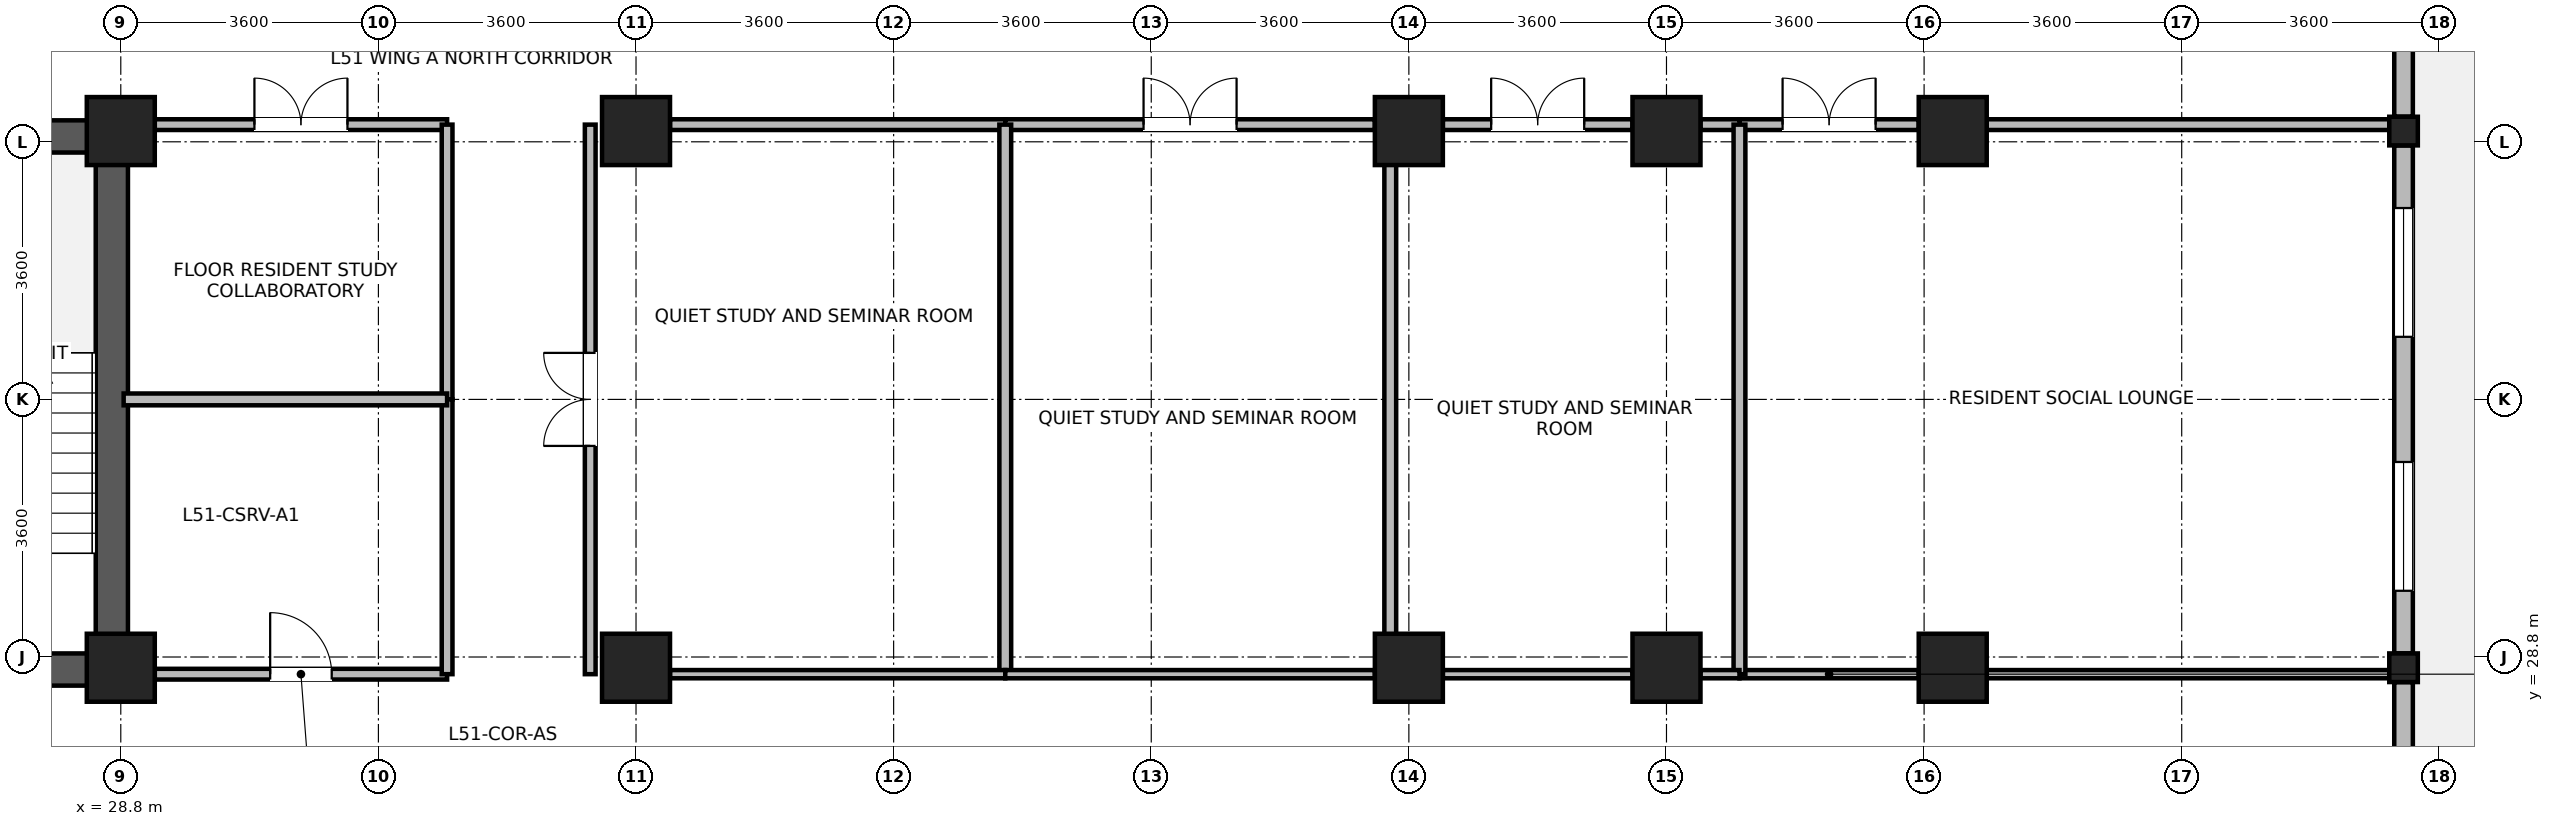
"""IFC4 building model, lengths in metres.
Left out: names, types, materials, properties, quantities, classifications, styles, units other than length and angle.
Written with IfcOpenShell. Run it as: python <this file> out.ifc"""

import sys

from ifc_helpers import new_model, si_unit, direction, frame, frame_2d, origin, origin_2d, place, context, subcontext, project, spatial, rectangle, i_section, extrude, source, transform, mapped, element, fill, save


model = new_model("IFC4")
c1 = context("Model", 3, precision=1e-05, world=origin(), true_north=direction((0.0, 1.0)))
c2 = subcontext(c1, "Body", "Model", "MODEL_VIEW")
j1 = project(units=[si_unit("LENGTHUNIT", "METRE"), si_unit("PLANEANGLEUNIT", "RADIAN")], contexts=[c1])
p1 = place(None, origin())
s1 = spatial("IfcSite", under=j1, at=p1, CompositionType="ELEMENT")
p2 = place(p1, origin())
s2 = spatial("IfcBuilding", under=s1, at=p2, CompositionType="ELEMENT")
p3 = place(p2, frame((0.0, 0.0, 201.8)))
s3 = spatial("IfcBuildingStorey", under=s2, at=p3, CompositionType="ELEMENT", Elevation=201.8)
p4 = place(p3, frame((28.675, 28.4, 0.0), z_axis=(0.0, 0.0, 1.0), x_axis=(0.0, 1.0, 0.0)))
e1 = element("IfcWall", 1, at=p4, inside=s3, PredefinedType="SHEAR", context=c2, shape_type="SweptSolid", body=[
    extrude(rectangle(XDim=7.9, YDim=0.45, at=frame_2d((3.95, 0.0))), origin(), (0.0, 0.0, 1.0), 3.47),
])
for number, where, z_axis, x_axis in (
    (2, (25.25, 28.625, 0.0), (0.0, 0.0, 1.0), (1.0, 0.0, 0.0)),
    (3, (25.25, 36.075, 0.0), (0.0, 0.0, 1.0), (1.0, 0.0, 0.0)),
):
    element("IfcWall", number, at=place(p3, frame(where, z_axis=z_axis, x_axis=x_axis)), inside=s3, PredefinedType="SHEAR", context=c2, shape_type="SweptSolid", body=[
        extrude(rectangle(XDim=3.2, YDim=0.45, at=frame_2d((1.6, 0.0))), origin(), (0.0, 0.0, 1.0), 3.47),
    ])
m1 = source(origin(), c2, "Body", "SweptSolid", [
    extrude(rectangle(XDim=0.95, YDim=0.95, at=origin_2d()), origin(), (0.0, 0.0, 1.0), 3.7),
])
for number, where, z_axis, x_axis in (
    (4, (28.8, 28.65, 0.0), (0.0, 0.0, 1.0), (1.0, 0.0, 0.0)),
    (5, (28.8, 36.15, 0.0), (0.0, 0.0, 1.0), (1.0, 0.0, 0.0)),
    (6, (36.0, 28.65, 0.0), (0.0, 0.0, 1.0), (1.0, 0.0, 0.0)),
    (7, (36.0, 36.15, 0.0), (0.0, 0.0, 1.0), (1.0, 0.0, 0.0)),
    (8, (46.8, 28.65, 0.0), (0.0, 0.0, 1.0), (1.0, 0.0, 0.0)),
    (9, (46.8, 36.15, 0.0), (0.0, 0.0, 1.0), (1.0, 0.0, 0.0)),
    (10, (50.4, 28.65, 0.0), (0.0, 0.0, 1.0), (1.0, 0.0, 0.0)),
    (11, (50.4, 36.15, 0.0), (0.0, 0.0, 1.0), (1.0, 0.0, 0.0)),
    (12, (54.4, 28.65, 0.0), (0.0, 0.0, 1.0), (1.0, 0.0, 0.0)),
    (13, (54.4, 36.15, 0.0), (0.0, 0.0, 1.0), (1.0, 0.0, 0.0)),
):
    element("IfcColumn", number, at=place(p3, frame(where, z_axis=z_axis, x_axis=x_axis)), inside=s3, PredefinedType="COLUMN", context=c2, shape_type="MappedRepresentation", body=[
        mapped(m1, transform((0.0, 0.0, 0.0), x_axis=(1.0, 0.0, 0.0), y_axis=(0.0, 1.0, 0.0), z_axis=(0.0, 0.0, 1.0), scale=1.0)),
    ])
m2 = source(origin(), c2, "Body", "SweptSolid", [
    extrude(i_section(OverallWidth=0.399, OverallDepth=0.4, WebThickness=0.017, FlangeThickness=0.023, FilletRadius=0.015, at=origin_2d()), origin(), (0.0, 0.0, 1.0), 3.7),
])
for number, where, z_axis, x_axis in (
    (14, (60.7, 28.65, 0.0), (0.0, 0.0, 1.0), (1.0, 0.0, 0.0)),
    (15, (60.7, 36.15, 0.0), (0.0, 0.0, 1.0), (1.0, 0.0, 0.0)),
):
    element("IfcColumn", number, at=place(p3, frame(where, z_axis=z_axis, x_axis=x_axis)), inside=s3, PredefinedType="COLUMN", context=c2, shape_type="MappedRepresentation", body=[
        mapped(m2, transform((0.0, 0.0, 0.0), x_axis=(1.0, 0.0, 0.0), y_axis=(0.0, 1.0, 0.0), z_axis=(0.0, 0.0, 1.0), scale=1.0)),
    ])
p5 = place(p3, frame((60.7, 28.449, 0.0), z_axis=(0.0, 0.0, 1.0), x_axis=(0.0, -1.0, 0.0)))
e16 = element("IfcWall", 16, at=p5, inside=s3, PredefinedType="STANDARD", context=c2, shape_type="SweptSolid", body=[
    extrude(rectangle(XDim=6.648, YDim=0.26, at=frame_2d((3.324, 0.0))), origin(), (0.0, 0.0, 1.0), 3.0),
])
p6 = place(p5, frame((4.086, 0.0, 0.85)))
e17 = element("IfcOpeningElement", 17, at=p6, cuts=e16, PredefinedType="OPENING", context=c2, shape_type="SweptSolid", body=[
    extrude(rectangle(XDim=1.8, YDim=1.85, at=frame_2d((0.9, 0.925))), frame((0.0, 0.14, 0.0), z_axis=(0.0, -1.0, 0.0), x_axis=(1.0, 0.0, 0.0)), (0.0, 0.0, 1.0), 0.28),
])
p7 = place(p5, frame((2.317, 0.0, 0.85)))
e18 = element("IfcOpeningElement", 18, at=p7, cuts=e16, PredefinedType="OPENING", context=c2, shape_type="SweptSolid", body=[
    extrude(rectangle(XDim=0.95, YDim=1.75, at=frame_2d((0.475, 0.875))), frame((0.0, 0.14, 0.0), z_axis=(0.0, -1.0, 0.0), x_axis=(1.0, 0.0, 0.0)), (0.0, 0.0, 1.0), 0.28),
])
p8 = place(p3, frame((60.7, 35.949, 0.0), z_axis=(0.0, 0.0, 1.0), x_axis=(0.0, -1.0, 0.0)))
e19 = element("IfcWall", 19, at=p8, inside=s3, PredefinedType="STANDARD", context=c2, shape_type="SweptSolid", body=[
    extrude(rectangle(XDim=7.098, YDim=0.26, at=frame_2d((3.549, 0.0))), origin(), (0.0, 0.0, 1.0), 3.0),
])
p9 = place(p8, frame((0.875, 0.0, 0.85)))
e20 = element("IfcOpeningElement", 20, at=p9, cuts=e19, PredefinedType="OPENING", context=c2, shape_type="SweptSolid", body=[
    extrude(rectangle(XDim=1.8, YDim=1.85, at=frame_2d((0.9, 0.925))), frame((0.0, 0.14, 0.0), z_axis=(0.0, -1.0, 0.0), x_axis=(1.0, 0.0, 0.0)), (0.0, 0.0, 1.0), 0.28),
])
p10 = place(p8, frame((4.424, 0.0, 0.85)))
e21 = element("IfcOpeningElement", 21, at=p10, cuts=e19, PredefinedType="OPENING", context=c2, shape_type="SweptSolid", body=[
    extrude(rectangle(XDim=1.8, YDim=1.85, at=frame_2d((0.9, 0.925))), frame((0.0, 0.14, 0.0), z_axis=(0.0, -1.0, 0.0), x_axis=(1.0, 0.0, 0.0)), (0.0, 0.0, 1.0), 0.28),
])
p11 = place(p3, frame((60.7, 43.33, 0.0), z_axis=(0.0, 0.0, 1.0), x_axis=(0.0, -1.0, 0.0)))
e22 = element("IfcWall", 22, at=p11, inside=s3, PredefinedType="STANDARD", context=c2, shape_type="SweptSolid", body=[
    extrude(rectangle(XDim=6.979, YDim=0.26, at=frame_2d((3.49, 0.0))), origin(), (0.0, 0.0, 1.0), 3.45),
])
p12 = place(p11, frame((0.845, 0.0, 0.85)))
e23 = element("IfcOpeningElement", 23, at=p12, cuts=e22, PredefinedType="OPENING", context=c2, shape_type="SweptSolid", body=[
    extrude(rectangle(XDim=1.8, YDim=1.85, at=frame_2d((0.9, 0.925))), frame((0.0, 0.14, 0.0), z_axis=(0.0, -1.0, 0.0), x_axis=(1.0, 0.0, 0.0)), (0.0, 0.0, 1.0), 0.28),
])
p13 = place(p11, frame((3.014, 0.0, 0.85)))
e24 = element("IfcOpeningElement", 24, at=p13, cuts=e22, PredefinedType="OPENING", context=c2, shape_type="SweptSolid", body=[
    extrude(rectangle(XDim=0.95, YDim=1.75, at=frame_2d((0.475, 0.875))), frame((0.0, 0.14, 0.0), z_axis=(0.0, -1.0, 0.0), x_axis=(1.0, 0.0, 0.0)), (0.0, 0.0, 1.0), 0.28),
])
p14 = place(p3, frame((51.42, 36.24, 0.0), z_axis=(0.0, 0.0, 1.0), x_axis=(1.0, 0.0, 0.0)))
e25 = element("IfcWall", 25, at=p14, inside=s3, PredefinedType="PARTITIONING", context=c2, shape_type="SweptSolid", body=[
    extrude(rectangle(XDim=2.505, YDim=0.15, at=frame_2d((1.252, 0.0))), origin(), (0.0, 0.0, 1.0), 2.85),
])
p15 = place(p14, frame((0.603, 0.0, 0.0)))
e26 = element("IfcOpeningElement", 26, at=p15, cuts=e25, PredefinedType="OPENING", context=c2, shape_type="SweptSolid", body=[
    extrude(rectangle(XDim=1.3, YDim=2.12, at=frame_2d((0.65, 1.06))), frame((0.0, 0.085, 0.0), z_axis=(0.0, -1.0, 0.0), x_axis=(1.0, 0.0, 0.0)), (0.0, 0.0, 1.0), 0.17),
])
p16 = place(p3, frame((54.875, 36.24, 0.0), z_axis=(0.0, 0.0, 1.0), x_axis=(1.0, 0.0, 0.0)))
e27 = element("IfcWall", 27, at=p16, inside=s3, PredefinedType="PARTITIONING", context=c2, shape_type="SweptSolid", body=[
    extrude(rectangle(XDim=5.625, YDim=0.15, at=frame_2d((2.813, 0.0))), origin(), (0.0, 0.0, 1.0), 2.85),
])
p17 = place(p3, frame((35.36, 28.56, 0.0), z_axis=(0.0, 0.0, 1.0), x_axis=(0.0, 1.0, 0.0)))
e28 = element("IfcWall", 28, at=p17, inside=s3, PredefinedType="PARTITIONING", context=c2, shape_type="SweptSolid", body=[
    extrude(rectangle(XDim=7.68, YDim=0.15, at=frame_2d((3.84, 0.0))), origin(), (0.0, 0.0, 1.0), 3.45),
])
p18 = place(p17, frame((3.19, 0.0, 0.0)))
e29 = element("IfcOpeningElement", 29, at=p18, cuts=e28, PredefinedType="OPENING", context=c2, shape_type="SweptSolid", body=[
    extrude(rectangle(XDim=1.3, YDim=2.12, at=frame_2d((0.65, 1.06))), frame((0.0, 0.085, 0.0), z_axis=(0.0, -1.0, 0.0), x_axis=(1.0, 0.0, 0.0)), (0.0, 0.0, 1.0), 0.17),
])
p19 = place(p3, frame((36.475, 36.24, 0.0), z_axis=(0.0, 0.0, 1.0), x_axis=(1.0, 0.0, 0.0)))
e30 = element("IfcWall", 30, at=p19, inside=s3, PredefinedType="PARTITIONING", context=c2, shape_type="SweptSolid", body=[
    extrude(rectangle(XDim=4.685, YDim=0.15, at=frame_2d((2.342, 0.0))), origin(), (0.0, 0.0, 1.0), 2.85),
])
p20 = place(p3, frame((41.16, 36.24, 0.0), z_axis=(0.0, 0.0, 1.0), x_axis=(1.0, 0.0, 0.0)))
e31 = element("IfcWall", 31, at=p20, inside=s3, PredefinedType="PARTITIONING", context=c2, shape_type="SweptSolid", body=[
    extrude(rectangle(XDim=5.165, YDim=0.15, at=frame_2d((2.583, 0.0))), origin(), (0.0, 0.0, 1.0), 2.85),
])
p21 = place(p20, frame((1.933, 0.0, 0.0)))
e32 = element("IfcOpeningElement", 32, at=p21, cuts=e31, PredefinedType="OPENING", context=c2, shape_type="SweptSolid", body=[
    extrude(rectangle(XDim=1.3, YDim=2.12, at=frame_2d((0.65, 1.06))), frame((0.0, 0.085, 0.0), z_axis=(0.0, -1.0, 0.0), x_axis=(1.0, 0.0, 0.0)), (0.0, 0.0, 1.0), 0.17),
])
p22 = place(p3, frame((47.275, 36.24, 0.0), z_axis=(0.0, 0.0, 1.0), x_axis=(1.0, 0.0, 0.0)))
e33 = element("IfcWall", 33, at=p22, inside=s3, PredefinedType="PARTITIONING", context=c2, shape_type="SweptSolid", body=[
    extrude(rectangle(XDim=2.65, YDim=0.15, at=frame_2d((1.325, 0.0))), origin(), (0.0, 0.0, 1.0), 2.85),
])
p23 = place(p22, frame((0.675, 0.0, 0.0)))
e34 = element("IfcOpeningElement", 34, at=p23, cuts=e33, PredefinedType="OPENING", context=c2, shape_type="SweptSolid", body=[
    extrude(rectangle(XDim=1.3, YDim=2.12, at=frame_2d((0.65, 1.06))), frame((0.0, 0.085, 0.0), z_axis=(0.0, -1.0, 0.0), x_axis=(1.0, 0.0, 0.0)), (0.0, 0.0, 1.0), 0.17),
])
p24 = place(p3, frame((50.875, 36.24, 0.0), z_axis=(0.0, 0.0, 1.0), x_axis=(1.0, 0.0, 0.0)))
e35 = element("IfcWall", 35, at=p24, inside=s3, PredefinedType="PARTITIONING", context=c2, shape_type="SweptSolid", body=[
    extrude(rectangle(XDim=0.545, YDim=0.15, at=frame_2d((0.272, 0.0))), origin(), (0.0, 0.0, 1.0), 2.85),
])
p25 = place(p3, frame((29.275, 28.56, 0.0), z_axis=(0.0, 0.0, 1.0), x_axis=(1.0, 0.0, 0.0)))
e36 = element("IfcWall", 36, at=p25, inside=s3, PredefinedType="PARTITIONING", context=c2, shape_type="SweptSolid", body=[
    extrude(rectangle(XDim=4.085, YDim=0.15, at=frame_2d((2.042, 0.0))), origin(), (0.0, 0.0, 1.0), 2.85),
])
p26 = place(p25, frame((1.613, 0.0, 0.0)))
e37 = element("IfcOpeningElement", 37, at=p26, cuts=e36, PredefinedType="OPENING", context=c2, shape_type="SweptSolid", body=[
    extrude(rectangle(XDim=0.86, YDim=2.02, at=frame_2d((0.43, 1.01))), frame((0.0, 0.085, 0.0), z_axis=(0.0, -1.0, 0.0), x_axis=(1.0, 0.0, 0.0)), (0.0, 0.0, 1.0), 0.17),
])
p27 = place(p3, frame((29.275, 36.24, 0.0), z_axis=(0.0, 0.0, 1.0), x_axis=(1.0, 0.0, 0.0)))
e38 = element("IfcWall", 38, at=p27, inside=s3, PredefinedType="PARTITIONING", context=c2, shape_type="SweptSolid", body=[
    extrude(rectangle(XDim=4.085, YDim=0.15, at=frame_2d((2.042, 0.0))), origin(), (0.0, 0.0, 1.0), 2.85),
])
p28 = place(p27, frame((1.393, 0.0, 0.0)))
e39 = element("IfcOpeningElement", 39, at=p28, cuts=e38, PredefinedType="OPENING", context=c2, shape_type="SweptSolid", body=[
    extrude(rectangle(XDim=1.3, YDim=2.12, at=frame_2d((0.65, 1.06))), frame((0.0, 0.085, 0.0), z_axis=(0.0, -1.0, 0.0), x_axis=(1.0, 0.0, 0.0)), (0.0, 0.0, 1.0), 0.17),
])
p29 = place(p3, frame((33.36, 32.4, 0.0), z_axis=(0.0, 0.0, 1.0), x_axis=(0.0, 1.0, 0.0)))
e40 = element("IfcWall", 40, at=p29, inside=s3, PredefinedType="PARTITIONING", context=c2, shape_type="SweptSolid", body=[
    extrude(rectangle(XDim=3.84, YDim=0.15, at=frame_2d((1.92, 0.0))), origin(), (0.0, 0.0, 1.0), 3.45),
])
p30 = place(p3, frame((33.36, 28.56, 0.0), z_axis=(0.0, 0.0, 1.0), x_axis=(0.0, 1.0, 0.0)))
e41 = element("IfcWall", 41, at=p30, inside=s3, PredefinedType="PARTITIONING", context=c2, shape_type="SweptSolid", body=[
    extrude(rectangle(XDim=3.84, YDim=0.15, at=frame_2d((1.92, 0.0))), origin(), (0.0, 0.0, 1.0), 3.45),
])
p31 = place(p3, frame((51.42, 28.56, 0.0), z_axis=(0.0, 0.0, 1.0), x_axis=(1.0, 0.0, 0.0)))
e42 = element("IfcWall", 42, at=p31, inside=s3, PredefinedType="PARTITIONING", context=c2, shape_type="SweptSolid", body=[
    extrude(rectangle(XDim=2.505, YDim=0.115, at=frame_2d((1.252, 0.0))), origin(), (0.0, 0.0, 1.0), 2.85),
])
p32 = place(p3, frame((54.875, 28.56, 0.0), z_axis=(0.0, 0.0, 1.0), x_axis=(1.0, 0.0, 0.0)))
e43 = element("IfcWall", 43, at=p32, inside=s3, PredefinedType="PARTITIONING", context=c2, shape_type="SweptSolid", body=[
    extrude(rectangle(XDim=5.625, YDim=0.115, at=frame_2d((2.813, 0.0))), origin(), (0.0, 0.0, 1.0), 2.85),
])
for number, where, z_axis, x_axis in (
    (44, (41.16, 28.56, 0.0), (0.0, 0.0, 1.0), (0.0, 1.0, 0.0)),
    (45, (46.54, 28.56, 0.0), (0.0, 0.0, 1.0), (0.0, 1.0, 0.0)),
    (46, (51.42, 28.56, 0.0), (0.0, 0.0, 1.0), (0.0, 1.0, 0.0)),
):
    element("IfcWall", number, at=place(p3, frame(where, z_axis=z_axis, x_axis=x_axis)), inside=s3, PredefinedType="PARTITIONING", context=c2, shape_type="SweptSolid", body=[
        extrude(rectangle(XDim=7.68, YDim=0.165, at=frame_2d((3.84, 0.0))), origin(), (0.0, 0.0, 1.0), 3.45),
    ])
p33 = place(p3, frame((36.475, 28.56, 0.0), z_axis=(0.0, 0.0, 1.0), x_axis=(1.0, 0.0, 0.0)))
e47 = element("IfcWall", 47, at=p33, inside=s3, PredefinedType="PARTITIONING", context=c2, shape_type="SweptSolid", body=[
    extrude(rectangle(XDim=4.685, YDim=0.115, at=frame_2d((2.342, 0.0))), origin(), (0.0, 0.0, 1.0), 2.85),
])
p34 = place(p3, frame((41.16, 28.56, 0.0), z_axis=(0.0, 0.0, 1.0), x_axis=(1.0, 0.0, 0.0)))
e48 = element("IfcWall", 48, at=p34, inside=s3, PredefinedType="PARTITIONING", context=c2, shape_type="SweptSolid", body=[
    extrude(rectangle(XDim=5.165, YDim=0.115, at=frame_2d((2.583, 0.0))), origin(), (0.0, 0.0, 1.0), 2.85),
])
p35 = place(p3, frame((47.275, 28.56, 0.0), z_axis=(0.0, 0.0, 1.0), x_axis=(1.0, 0.0, 0.0)))
e49 = element("IfcWall", 49, at=p35, inside=s3, PredefinedType="PARTITIONING", context=c2, shape_type="SweptSolid", body=[
    extrude(rectangle(XDim=2.65, YDim=0.115, at=frame_2d((1.325, 0.0))), origin(), (0.0, 0.0, 1.0), 2.85),
])
p36 = place(p3, frame((50.875, 28.56, 0.0), z_axis=(0.0, 0.0, 1.0), x_axis=(1.0, 0.0, 0.0)))
e50 = element("IfcWall", 50, at=p36, inside=s3, PredefinedType="PARTITIONING", context=c2, shape_type="SweptSolid", body=[
    extrude(rectangle(XDim=0.545, YDim=0.115, at=frame_2d((0.272, 0.0))), origin(), (0.0, 0.0, 1.0), 2.85),
])
p37 = place(p3, frame((28.84, 32.4, 0.0), z_axis=(0.0, 0.0, 1.0), x_axis=(1.0, 0.0, 0.0)))
e51 = element("IfcWall", 51, at=p37, inside=s3, PredefinedType="PARTITIONING", context=c2, shape_type="SweptSolid", body=[
    extrude(rectangle(XDim=4.52, YDim=0.165, at=frame_2d((2.26, 0.0))), origin(), (0.0, 0.0, 1.0), 3.45),
])
p38 = place(p9, origin())
e52 = element("IfcWindow", 52, at=p38, inside=s3, PartitioningType="SINGLE_PANEL", PredefinedType="WINDOW", context=c2, shape_type="SweptSolid", body=[
    extrude(rectangle(XDim=1.8, YDim=1.85, at=frame_2d((0.9, 0.925))), frame((0.0, 0.03, 0.0), z_axis=(0.0, -1.0, 0.0), x_axis=(1.0, 0.0, 0.0)), (0.0, 0.0, 1.0), 0.06),
])
fill(e20, e52)
p39 = place(p10, origin())
e53 = element("IfcWindow", 53, at=p39, inside=s3, PartitioningType="SINGLE_PANEL", PredefinedType="WINDOW", context=c2, shape_type="SweptSolid", body=[
    extrude(rectangle(XDim=1.8, YDim=1.85, at=frame_2d((0.9, 0.925))), frame((0.0, 0.03, 0.0), z_axis=(0.0, -1.0, 0.0), x_axis=(1.0, 0.0, 0.0)), (0.0, 0.0, 1.0), 0.06),
])
fill(e21, e53)
p40 = place(p15, origin())
e54 = element("IfcDoor", 54, at=p40, inside=s3, OperationType="DOUBLE_DOOR_SINGLE_SWING", PredefinedType="DOOR", context=c2, shape_type="SweptSolid", body=[
    extrude(rectangle(XDim=1.3, YDim=2.12, at=frame_2d((0.65, 1.06))), frame((0.0, 0.025, 0.0), z_axis=(0.0, -1.0, 0.0), x_axis=(1.0, 0.0, 0.0)), (0.0, 0.0, 1.0), 0.05),
])
fill(e26, e54)
p41 = place(p18, origin())
e55 = element("IfcDoor", 55, at=p41, inside=s3, OperationType="DOUBLE_DOOR_SINGLE_SWING", PredefinedType="DOOR", context=c2, shape_type="SweptSolid", body=[
    extrude(rectangle(XDim=1.3, YDim=2.12, at=frame_2d((0.65, 1.06))), frame((0.0, 0.025, 0.0), z_axis=(0.0, -1.0, 0.0), x_axis=(1.0, 0.0, 0.0)), (0.0, 0.0, 1.0), 0.05),
])
fill(e29, e55)
p42 = place(p21, origin())
e56 = element("IfcDoor", 56, at=p42, inside=s3, OperationType="DOUBLE_DOOR_SINGLE_SWING", PredefinedType="DOOR", context=c2, shape_type="SweptSolid", body=[
    extrude(rectangle(XDim=1.3, YDim=2.12, at=frame_2d((0.65, 1.06))), frame((0.0, 0.025, 0.0), z_axis=(0.0, -1.0, 0.0), x_axis=(1.0, 0.0, 0.0)), (0.0, 0.0, 1.0), 0.05),
])
fill(e32, e56)
p43 = place(p23, origin())
e57 = element("IfcDoor", 57, at=p43, inside=s3, OperationType="DOUBLE_DOOR_SINGLE_SWING", PredefinedType="DOOR", context=c2, shape_type="SweptSolid", body=[
    extrude(rectangle(XDim=1.3, YDim=2.12, at=frame_2d((0.65, 1.06))), frame((0.0, 0.025, 0.0), z_axis=(0.0, -1.0, 0.0), x_axis=(1.0, 0.0, 0.0)), (0.0, 0.0, 1.0), 0.05),
])
fill(e34, e57)
p44 = place(p26, origin())
e58 = element("IfcDoor", 58, at=p44, inside=s3, OperationType="SINGLE_SWING_LEFT", PredefinedType="DOOR", context=c2, shape_type="SweptSolid", body=[
    extrude(rectangle(XDim=0.86, YDim=2.02, at=frame_2d((0.43, 1.01))), frame((0.0, 0.025, 0.0), z_axis=(0.0, -1.0, 0.0), x_axis=(1.0, 0.0, 0.0)), (0.0, 0.0, 1.0), 0.05),
])
fill(e37, e58)
p45 = place(p28, origin())
e59 = element("IfcDoor", 59, at=p45, inside=s3, OperationType="DOUBLE_DOOR_SINGLE_SWING", PredefinedType="DOOR", context=c2, shape_type="SweptSolid", body=[
    extrude(rectangle(XDim=1.3, YDim=2.12, at=frame_2d((0.65, 1.06))), frame((0.0, 0.025, 0.0), z_axis=(0.0, -1.0, 0.0), x_axis=(1.0, 0.0, 0.0)), (0.0, 0.0, 1.0), 0.05),
])
fill(e39, e59)
save(model, sys.argv[1])
